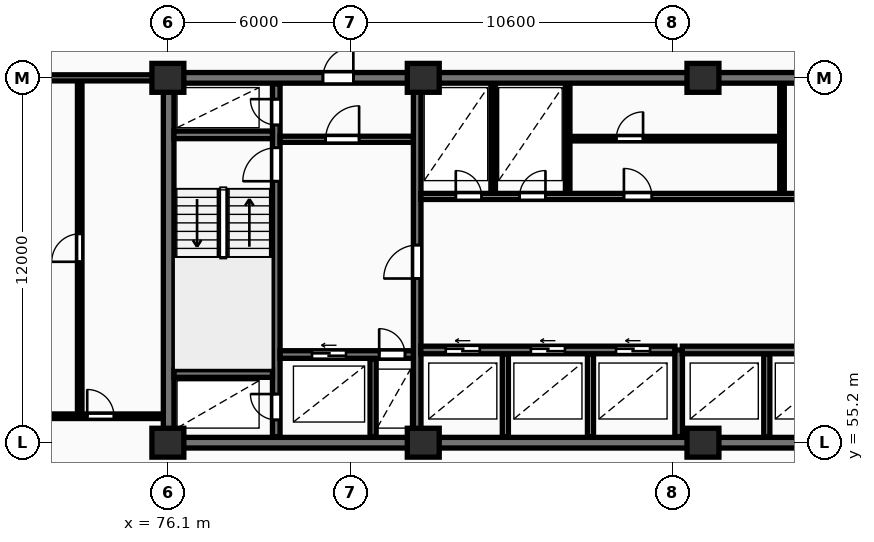
"""IFC4 building model, lengths in metres.
Left out: names, types, materials, properties, quantities, classifications, styles, units other than length and angle.
Written with IfcOpenShell. Run it as: python <this file> out.ifc"""

import sys

from ifc_helpers import new_model, si_unit, direction, frame, frame_2d, origin, origin_2d, place, context, subcontext, project, spatial, rectangle, extrude, element, fill, save


model = new_model("IFC4")
c1 = context("Model", 3, precision=1e-05, world=origin(), true_north=direction((0.0, 1.0)))
c2 = subcontext(c1, "Body", "Model", "MODEL_VIEW")
j1 = project(units=[si_unit("LENGTHUNIT", "METRE"), si_unit("PLANEANGLEUNIT", "RADIAN")], contexts=[c1])
p1 = place(None, origin())
s1 = spatial("IfcSite", under=j1, at=p1, CompositionType="ELEMENT")
p2 = place(p1, origin())
s2 = spatial("IfcBuilding", under=s1, at=p2, CompositionType="ELEMENT")
p3 = place(p2, frame((0.0, 0.0, 24.0)))
s3 = spatial("IfcBuildingStorey", under=s2, at=p3, CompositionType="ELEMENT", Elevation=24.0)
for number, where, z_axis, x_axis in (
    (1, (76.1, 55.2, 0.0), (0.0, 0.0, 1.0), (1.0, 0.0, 0.0)),
    (2, (76.1, 67.2, 0.0), (0.0, 0.0, 1.0), (1.0, 0.0, 0.0)),
    (3, (84.5, 55.2, 0.0), (0.0, 0.0, 1.0), (1.0, 0.0, 0.0)),
    (4, (84.5, 67.2, 0.0), (0.0, 0.0, 1.0), (1.0, 0.0, 0.0)),
    (5, (93.7, 55.2, 0.0), (0.0, 0.0, 1.0), (1.0, 0.0, 0.0)),
    (6, (93.7, 67.2, 0.0), (0.0, 0.0, 1.0), (1.0, 0.0, 0.0)),
):
    element("IfcColumn", number, at=place(p3, frame(where, z_axis=z_axis, x_axis=x_axis)), inside=s3, PredefinedType="COLUMN", context=c2, shape_type="SweptSolid", body=[
        extrude(rectangle(XDim=1.05, YDim=0.95, at=origin_2d()), origin(), (0.0, 0.0, 1.0), 3.25),
    ])
p4 = place(p3, frame((75.95, 55.2, 0.0), z_axis=(0.0, 0.0, 1.0), x_axis=(1.0, 0.0, 0.0)))
e7 = element("IfcWall", 7, at=p4, inside=s3, PredefinedType="SHEAR", context=c2, shape_type="SweptSolid", body=[
    extrude(rectangle(XDim=36.3, YDim=0.35, at=frame_2d((18.15, 0.0))), origin(), (0.0, 0.0, 1.0), 3.25),
])
p5 = place(p3, frame((76.125, 55.375, 0.0), z_axis=(0.0, 0.0, 1.0), x_axis=(0.0, 1.0, 0.0)))
e8 = element("IfcWall", 8, at=p5, inside=s3, PredefinedType="SHEAR", context=c2, shape_type="SweptSolid", body=[
    extrude(rectangle(XDim=11.65, YDim=0.35, at=frame_2d((5.825, 0.0))), origin(), (0.0, 0.0, 1.0), 3.25),
])
p6 = place(p3, frame((75.95, 67.2, 0.0), z_axis=(0.0, 0.0, 1.0), x_axis=(1.0, 0.0, 0.0)))
e9 = element("IfcWall", 9, at=p6, inside=s3, PredefinedType="SHEAR", context=c2, shape_type="SweptSolid", body=[
    extrude(rectangle(XDim=36.3, YDim=0.35, at=frame_2d((18.15, 0.0))), origin(), (0.0, 0.0, 1.0), 3.25),
])
p7 = place(p6, frame((5.25, 0.0, 0.0)))
e10 = element("IfcOpeningElement", 10, at=p7, cuts=e9, PredefinedType="OPENING", context=c2, shape_type="SweptSolid", body=[
    extrude(rectangle(XDim=1.0, YDim=2.15, at=frame_2d((0.5, 1.075))), frame((0.0, 0.185, 0.0), z_axis=(0.0, -1.0, 0.0), x_axis=(1.0, 0.0, 0.0)), (0.0, 0.0, 1.0), 0.37),
])
p8 = place(p6, frame((21.6, 0.0, 0.0)))
e11 = element("IfcOpeningElement", 11, at=p8, cuts=e9, PredefinedType="OPENING", context=c2, shape_type="SweptSolid", body=[
    extrude(rectangle(XDim=1.5, YDim=2.2, at=frame_2d((0.75, 1.1))), frame((0.0, 0.185, 0.0), z_axis=(0.0, -1.0, 0.0), x_axis=(1.0, 0.0, 0.0)), (0.0, 0.0, 1.0), 0.37),
])
p9 = place(p6, frame((30.45, 0.0, 0.0)))
e12 = element("IfcOpeningElement", 12, at=p9, cuts=e9, PredefinedType="OPENING", context=c2, shape_type="SweptSolid", body=[
    extrude(rectangle(XDim=1.0, YDim=2.15, at=frame_2d((0.5, 1.075))), frame((0.0, 0.185, 0.0), z_axis=(0.0, -1.0, 0.0), x_axis=(1.0, 0.0, 0.0)), (0.0, 0.0, 1.0), 0.37),
])
p10 = place(p3, frame((79.665, 55.4, 0.0), z_axis=(0.0, 0.0, 1.0), x_axis=(0.0, 1.0, 0.0)))
e13 = element("IfcWall", 13, at=p10, inside=s3, PredefinedType="SHEAR", context=c2, shape_type="SweptSolid", body=[
    extrude(rectangle(XDim=11.6, YDim=0.25, at=frame_2d((5.8, 0.0))), origin(), (0.0, 0.0, 1.0), 3.25),
])
p11 = place(p10, frame((0.55, 0.0, 0.0)))
e14 = element("IfcOpeningElement", 14, at=p11, cuts=e13, PredefinedType="OPENING", context=c2, shape_type="SweptSolid", body=[
    extrude(rectangle(XDim=0.85, YDim=2.05, at=frame_2d((0.425, 1.025))), frame((0.0, 0.135, 0.0), z_axis=(0.0, -1.0, 0.0), x_axis=(1.0, 0.0, 0.0)), (0.0, 0.0, 1.0), 0.27),
])
p12 = place(p10, frame((8.4, 0.0, 0.0)))
e15 = element("IfcOpeningElement", 15, at=p12, cuts=e13, PredefinedType="OPENING", context=c2, shape_type="SweptSolid", body=[
    extrude(rectangle(XDim=1.1, YDim=2.1, at=frame_2d((0.55, 1.05))), frame((0.0, 0.135, 0.0), z_axis=(0.0, -1.0, 0.0), x_axis=(1.0, 0.0, 0.0)), (0.0, 0.0, 1.0), 0.27),
])
p13 = place(p10, frame((10.25, 0.0, 0.0)))
e16 = element("IfcOpeningElement", 16, at=p13, cuts=e13, PredefinedType="OPENING", context=c2, shape_type="SweptSolid", body=[
    extrude(rectangle(XDim=0.85, YDim=2.05, at=frame_2d((0.425, 1.025))), frame((0.0, 0.135, 0.0), z_axis=(0.0, -1.0, 0.0), x_axis=(1.0, 0.0, 0.0)), (0.0, 0.0, 1.0), 0.27),
])
for number, where, z_axis, x_axis in (
    (17, (76.3, 57.475, 0.0), (0.0, 0.0, 1.0), (1.0, 0.0, 0.0)),
    (18, (76.3, 65.325, 0.0), (0.0, 0.0, 1.0), (1.0, 0.0, 0.0)),
):
    element("IfcWall", number, at=place(p3, frame(where, z_axis=z_axis, x_axis=x_axis)), inside=s3, PredefinedType="SHEAR", context=c2, shape_type="SweptSolid", body=[
        extrude(rectangle(XDim=3.24, YDim=0.25, at=frame_2d((1.62, 0.0))), origin(), (0.0, 0.0, 1.0), 3.25),
    ])
p14 = place(p3, frame((79.79, 58.1, 0.0), z_axis=(0.0, 0.0, 1.0), x_axis=(1.0, 0.0, 0.0)))
e19 = element("IfcWall", 19, at=p14, inside=s3, PredefinedType="SHEAR", context=c2, shape_type="SweptSolid", body=[
    extrude(rectangle(XDim=4.39, YDim=0.25, at=frame_2d((2.195, 0.0))), origin(), (0.0, 0.0, 1.0), 3.25),
])
p15 = place(p14, frame((1.05, 0.0, 0.0)))
e20 = element("IfcOpeningElement", 20, at=p15, cuts=e19, PredefinedType="OPENING", context=c2, shape_type="SweptSolid", body=[
    extrude(rectangle(XDim=1.12, YDim=2.12, at=frame_2d((0.56, 1.06))), frame((0.0, 0.135, 0.0), z_axis=(0.0, -1.0, 0.0), x_axis=(1.0, 0.0, 0.0)), (0.0, 0.0, 1.0), 0.27),
])
p16 = place(p14, frame((3.26, 0.0, 0.0)))
e21 = element("IfcOpeningElement", 21, at=p16, cuts=e19, PredefinedType="OPENING", context=c2, shape_type="SweptSolid", body=[
    extrude(rectangle(XDim=0.85, YDim=2.05, at=frame_2d((0.425, 1.025))), frame((0.0, 0.135, 0.0), z_axis=(0.0, -1.0, 0.0), x_axis=(1.0, 0.0, 0.0)), (0.0, 0.0, 1.0), 0.27),
])
p17 = place(p3, frame((82.85, 55.4, 0.0), z_axis=(0.0, 0.0, 1.0), x_axis=(0.0, 1.0, 0.0)))
e22 = element("IfcWall", 22, at=p17, inside=s3, PredefinedType="PARTITIONING", context=c2, shape_type="SweptSolid", body=[
    extrude(rectangle(XDim=2.56, YDim=0.2, at=frame_2d((1.28, 0.0))), origin(), (0.0, 0.0, 1.0), 2.97),
])
p18 = place(p3, frame((79.79, 65.18, 0.0), z_axis=(0.0, 0.0, 1.0), x_axis=(1.0, 0.0, 0.0)))
e23 = element("IfcWall", 23, at=p18, inside=s3, PredefinedType="PARTITIONING", context=c2, shape_type="SweptSolid", body=[
    extrude(rectangle(XDim=4.39, YDim=0.2, at=frame_2d((2.195, 0.0))), origin(), (0.0, 0.0, 1.0), 2.97),
])
p19 = place(p18, frame((1.5, 0.0, 0.0)))
e24 = element("IfcOpeningElement", 24, at=p19, cuts=e23, PredefinedType="OPENING", context=c2, shape_type="SweptSolid", body=[
    extrude(rectangle(XDim=1.1, YDim=2.1, at=frame_2d((0.55, 1.05))), frame((0.0, 0.11, 0.0), z_axis=(0.0, -1.0, 0.0), x_axis=(1.0, 0.0, 0.0)), (0.0, 0.0, 1.0), 0.22),
])
p20 = place(p3, frame((84.3, 55.4, 0.0), z_axis=(0.0, 0.0, 1.0), x_axis=(0.0, 1.0, 0.0)))
e25 = element("IfcWall", 25, at=p20, inside=s3, PredefinedType="SHEAR", context=c2, shape_type="SweptSolid", body=[
    extrude(rectangle(XDim=11.6, YDim=0.25, at=frame_2d((5.8, 0.0))), origin(), (0.0, 0.0, 1.0), 3.25),
])
p21 = place(p20, frame((5.2, 0.0, 0.0)))
e26 = element("IfcOpeningElement", 26, at=p21, cuts=e25, PredefinedType="OPENING", context=c2, shape_type="SweptSolid", body=[
    extrude(rectangle(XDim=1.1, YDim=2.1, at=frame_2d((0.55, 1.05))), frame((0.0, 0.135, 0.0), z_axis=(0.0, -1.0, 0.0), x_axis=(1.0, 0.0, 0.0)), (0.0, 0.0, 1.0), 0.27),
])
for number, where, z_axis, x_axis in (
    (27, (87.2, 55.4, 0.0), (0.0, 0.0, 1.0), (0.0, 1.0, 0.0)),
    (28, (90.0, 55.4, 0.0), (0.0, 0.0, 1.0), (0.0, 1.0, 0.0)),
):
    element("IfcWall", number, at=place(p3, frame(where, z_axis=z_axis, x_axis=x_axis)), inside=s3, PredefinedType="PARTITIONING", context=c2, shape_type="SweptSolid", body=[
        extrude(rectangle(XDim=2.72, YDim=0.2, at=frame_2d((1.36, 0.0))), origin(), (0.0, 0.0, 1.0), 2.97),
    ])
p22 = place(p3, frame((84.42, 58.25, 0.0), z_axis=(0.0, 0.0, 1.0), x_axis=(1.0, 0.0, 0.0)))
e29 = element("IfcWall", 29, at=p22, inside=s3, PredefinedType="SHEAR", context=c2, shape_type="SweptSolid", body=[
    extrude(rectangle(XDim=8.36, YDim=0.25, at=frame_2d((4.18, 0.0))), origin(), (0.0, 0.0, 1.0), 3.25),
])
p23 = place(p22, frame((0.82, 0.0, 0.0)))
e30 = element("IfcOpeningElement", 30, at=p23, cuts=e29, PredefinedType="OPENING", context=c2, shape_type="SweptSolid", body=[
    extrude(rectangle(XDim=1.12, YDim=2.12, at=frame_2d((0.56, 1.06))), frame((0.0, 0.135, 0.0), z_axis=(0.0, -1.0, 0.0), x_axis=(1.0, 0.0, 0.0)), (0.0, 0.0, 1.0), 0.27),
])
p24 = place(p22, frame((3.62, 0.0, 0.0)))
e31 = element("IfcOpeningElement", 31, at=p24, cuts=e29, PredefinedType="OPENING", context=c2, shape_type="SweptSolid", body=[
    extrude(rectangle(XDim=1.12, YDim=2.12, at=frame_2d((0.56, 1.06))), frame((0.0, 0.135, 0.0), z_axis=(0.0, -1.0, 0.0), x_axis=(1.0, 0.0, 0.0)), (0.0, 0.0, 1.0), 0.27),
])
p25 = place(p22, frame((6.42, 0.0, 0.0)))
e32 = element("IfcOpeningElement", 32, at=p25, cuts=e29, PredefinedType="OPENING", context=c2, shape_type="SweptSolid", body=[
    extrude(rectangle(XDim=1.12, YDim=2.12, at=frame_2d((0.56, 1.06))), frame((0.0, 0.135, 0.0), z_axis=(0.0, -1.0, 0.0), x_axis=(1.0, 0.0, 0.0)), (0.0, 0.0, 1.0), 0.27),
])
p26 = place(p3, frame((92.9, 55.4, 0.0), z_axis=(0.0, 0.0, 1.0), x_axis=(0.0, 1.0, 0.0)))
e33 = element("IfcWall", 33, at=p26, inside=s3, PredefinedType="SHEAR", context=c2, shape_type="SweptSolid", body=[
    extrude(rectangle(XDim=2.85, YDim=0.25, at=frame_2d((1.425, 0.0))), origin(), (0.0, 0.0, 1.0), 3.25),
])
p27 = place(p3, frame((95.8, 55.4, 0.0), z_axis=(0.0, 0.0, 1.0), x_axis=(0.0, 1.0, 0.0)))
e34 = element("IfcWall", 34, at=p27, inside=s3, PredefinedType="PARTITIONING", context=c2, shape_type="SweptSolid", body=[
    extrude(rectangle(XDim=2.72, YDim=0.2, at=frame_2d((1.36, 0.0))), origin(), (0.0, 0.0, 1.0), 2.97),
])
p28 = place(p3, frame((93.02, 58.25, 0.0), z_axis=(0.0, 0.0, 1.0), x_axis=(1.0, 0.0, 0.0)))
e35 = element("IfcWall", 35, at=p28, inside=s3, PredefinedType="SHEAR", context=c2, shape_type="SweptSolid", body=[
    extrude(rectangle(XDim=8.36, YDim=0.25, at=frame_2d((4.18, 0.0))), origin(), (0.0, 0.0, 1.0), 3.25),
])
for number, where, z_axis, x_axis in (
    (36, (86.8, 63.4, 0.0), (0.0, 0.0, 1.0), (0.0, 1.0, 0.0)),
    (37, (89.25, 63.4, 0.0), (0.0, 0.0, 1.0), (0.0, 1.0, 0.0)),
):
    element("IfcWall", number, at=place(p3, frame(where, z_axis=z_axis, x_axis=x_axis)), inside=s3, PredefinedType="PARTITIONING", context=c2, shape_type="SweptSolid", body=[
        extrude(rectangle(XDim=3.6, YDim=0.15, at=frame_2d((1.8, 0.0))), origin(), (0.0, 0.0, 1.0), 2.97),
    ])
p29 = place(p3, frame((89.25, 65.2, 0.0), z_axis=(0.0, 0.0, 1.0), x_axis=(1.0, 0.0, 0.0)))
e38 = element("IfcWall", 38, at=p29, inside=s3, PredefinedType="PARTITIONING", context=c2, shape_type="SweptSolid", body=[
    extrude(rectangle(XDim=7.05, YDim=0.15, at=frame_2d((3.525, 0.0))), origin(), (0.0, 0.0, 1.0), 2.97),
])
p30 = place(p29, frame((1.6, 0.0, 0.0)))
e39 = element("IfcOpeningElement", 39, at=p30, cuts=e38, PredefinedType="OPENING", context=c2, shape_type="SweptSolid", body=[
    extrude(rectangle(XDim=0.88, YDim=2.06, at=frame_2d((0.44, 1.03))), frame((0.0, 0.085, 0.0), z_axis=(0.0, -1.0, 0.0), x_axis=(1.0, 0.0, 0.0)), (0.0, 0.0, 1.0), 0.17),
])
p31 = place(p3, frame((96.3, 63.4, 0.0), z_axis=(0.0, 0.0, 1.0), x_axis=(0.0, 1.0, 0.0)))
e40 = element("IfcWall", 40, at=p31, inside=s3, PredefinedType="PARTITIONING", context=c2, shape_type="SweptSolid", body=[
    extrude(rectangle(XDim=3.6, YDim=0.15, at=frame_2d((1.8, 0.0))), origin(), (0.0, 0.0, 1.0), 2.97),
])
p32 = place(p3, frame((84.42, 63.3, 0.0), z_axis=(0.0, 0.0, 1.0), x_axis=(1.0, 0.0, 0.0)))
e41 = element("IfcWall", 41, at=p32, inside=s3, PredefinedType="PARTITIONING", context=c2, shape_type="SweptSolid", body=[
    extrude(rectangle(XDim=19.83, YDim=0.2, at=frame_2d((9.915, 0.0))), origin(), (0.0, 0.0, 1.0), 2.97),
])
p33 = place(p32, frame((1.15, 0.0, 0.0)))
e42 = element("IfcOpeningElement", 42, at=p33, cuts=e41, PredefinedType="OPENING", context=c2, shape_type="SweptSolid", body=[
    extrude(rectangle(XDim=0.85, YDim=2.05, at=frame_2d((0.425, 1.025))), frame((0.0, 0.11, 0.0), z_axis=(0.0, -1.0, 0.0), x_axis=(1.0, 0.0, 0.0)), (0.0, 0.0, 1.0), 0.22),
])
p34 = place(p32, frame((3.25, 0.0, 0.0)))
e43 = element("IfcOpeningElement", 43, at=p34, cuts=e41, PredefinedType="OPENING", context=c2, shape_type="SweptSolid", body=[
    extrude(rectangle(XDim=0.85, YDim=2.05, at=frame_2d((0.425, 1.025))), frame((0.0, 0.11, 0.0), z_axis=(0.0, -1.0, 0.0), x_axis=(1.0, 0.0, 0.0)), (0.0, 0.0, 1.0), 0.22),
])
p35 = place(p32, frame((13.08, 0.0, 0.0)))
e44 = element("IfcOpeningElement", 44, at=p35, cuts=e41, PredefinedType="OPENING", context=c2, shape_type="SweptSolid", body=[
    extrude(rectangle(XDim=1.5, YDim=2.2, at=frame_2d((0.75, 1.1))), frame((0.0, 0.11, 0.0), z_axis=(0.0, -1.0, 0.0), x_axis=(1.0, 0.0, 0.0)), (0.0, 0.0, 1.0), 0.22),
])
p36 = place(p32, frame((6.68, 0.0, 0.0)))
e45 = element("IfcOpeningElement", 45, at=p36, cuts=e41, PredefinedType="OPENING", context=c2, shape_type="SweptSolid", body=[
    extrude(rectangle(XDim=0.92, YDim=2.08, at=frame_2d((0.46, 1.04))), frame((0.0, 0.11, 0.0), z_axis=(0.0, -1.0, 0.0), x_axis=(1.0, 0.0, 0.0)), (0.0, 0.0, 1.0), 0.22),
])
p37 = place(p32, frame((16.33, 0.0, 0.0)))
e46 = element("IfcOpeningElement", 46, at=p37, cuts=e41, PredefinedType="OPENING", context=c2, shape_type="SweptSolid", body=[
    extrude(rectangle(XDim=0.88, YDim=2.06, at=frame_2d((0.44, 1.03))), frame((0.0, 0.11, 0.0), z_axis=(0.0, -1.0, 0.0), x_axis=(1.0, 0.0, 0.0)), (0.0, 0.0, 1.0), 0.22),
])
p38 = place(p3, frame((73.2, 56.07, 0.0), z_axis=(0.0, 0.0, 1.0), x_axis=(0.0, 1.0, 0.0)))
e47 = element("IfcWall", 47, at=p38, inside=s3, PredefinedType="PARTITIONING", context=c2, shape_type="SweptSolid", body=[
    extrude(rectangle(XDim=11.08, YDim=0.15, at=frame_2d((5.54, 0.0))), origin(), (0.0, 0.0, 1.0), 2.97),
])
p39 = place(p38, frame((5.08, 0.0, 0.0)))
e48 = element("IfcOpeningElement", 48, at=p39, cuts=e47, PredefinedType="OPENING", context=c2, shape_type="SweptSolid", body=[
    extrude(rectangle(XDim=0.92, YDim=2.08, at=frame_2d((0.46, 1.04))), frame((0.0, 0.085, 0.0), z_axis=(0.0, -1.0, 0.0), x_axis=(1.0, 0.0, 0.0)), (0.0, 0.0, 1.0), 0.17),
])
p40 = place(p3, frame((69.17, 56.07, 0.0), z_axis=(0.0, 0.0, 1.0), x_axis=(1.0, 0.0, 0.0)))
e49 = element("IfcWall", 49, at=p40, inside=s3, PredefinedType="PARTITIONING", context=c2, shape_type="SweptSolid", body=[
    extrude(rectangle(XDim=6.76, YDim=0.15, at=frame_2d((3.38, 0.0))), origin(), (0.0, 0.0, 1.0), 2.97),
])
p41 = place(p40, frame((1.362, 0.0, 0.0)))
e50 = element("IfcOpeningElement", 50, at=p41, cuts=e49, PredefinedType="OPENING", context=c2, shape_type="SweptSolid", body=[
    extrude(rectangle(XDim=0.84, YDim=2.04, at=frame_2d((0.42, 1.02))), frame((0.0, 0.085, 0.0), z_axis=(0.0, -1.0, 0.0), x_axis=(1.0, 0.0, 0.0)), (0.0, 0.0, 1.0), 0.17),
])
p42 = place(p40, frame((4.277, 0.0, 0.0)))
e51 = element("IfcOpeningElement", 51, at=p42, cuts=e49, PredefinedType="OPENING", context=c2, shape_type="SweptSolid", body=[
    extrude(rectangle(XDim=0.88, YDim=2.06, at=frame_2d((0.44, 1.03))), frame((0.0, 0.085, 0.0), z_axis=(0.0, -1.0, 0.0), x_axis=(1.0, 0.0, 0.0)), (0.0, 0.0, 1.0), 0.17),
])
p43 = place(p3, frame((55.3, 67.2, 0.0), z_axis=(0.0, 0.0, 1.0), x_axis=(1.0, 0.0, 0.0)))
e52 = element("IfcWall", 52, at=p43, inside=s3, PredefinedType="PARTITIONING", context=c2, shape_type="SweptSolid", body=[
    extrude(rectangle(XDim=20.65, YDim=0.2, at=frame_2d((10.325, 0.0))), origin(), (0.0, 0.0, 1.0), 2.37),
])
p44 = place(p43, frame((14.426, 0.0, 0.0)))
e53 = element("IfcOpeningElement", 53, at=p44, cuts=e52, PredefinedType="OPENING", context=c2, shape_type="SweptSolid", body=[
    extrude(rectangle(XDim=0.95, YDim=2.15, at=frame_2d((0.475, 1.075))), frame((0.0, 0.11, 0.0), z_axis=(0.0, -1.0, 0.0), x_axis=(1.0, 0.0, 0.0)), (0.0, 0.0, 1.0), 0.22),
])
p45 = place(p7, origin())
e54 = element("IfcDoor", 54, at=p45, inside=s3, OperationType="SINGLE_SWING_RIGHT", PredefinedType="DOOR", context=c2, shape_type="SweptSolid", body=[
    extrude(rectangle(XDim=1.0, YDim=2.15, at=frame_2d((0.5, 1.075))), frame((0.0, 0.025, 0.0), z_axis=(0.0, -1.0, 0.0), x_axis=(1.0, 0.0, 0.0)), (0.0, 0.0, 1.0), 0.05),
])
fill(e10, e54)
p46 = place(p11, origin())
e55 = element("IfcDoor", 55, at=p46, inside=s3, OperationType="SINGLE_SWING_RIGHT", PredefinedType="DOOR", context=c2, shape_type="SweptSolid", body=[
    extrude(rectangle(XDim=0.85, YDim=2.05, at=frame_2d((0.425, 1.025))), frame((0.0, 0.025, 0.0), z_axis=(0.0, -1.0, 0.0), x_axis=(1.0, 0.0, 0.0)), (0.0, 0.0, 1.0), 0.05),
])
fill(e14, e55)
p47 = place(p12, origin())
e56 = element("IfcDoor", 56, at=p47, inside=s3, OperationType="SINGLE_SWING_LEFT", PredefinedType="DOOR", context=c2, shape_type="SweptSolid", body=[
    extrude(rectangle(XDim=1.1, YDim=2.1, at=frame_2d((0.55, 1.05))), frame((0.0, 0.025, 0.0), z_axis=(0.0, -1.0, 0.0), x_axis=(1.0, 0.0, 0.0)), (0.0, 0.0, 1.0), 0.05),
])
fill(e15, e56)
p48 = place(p13, origin())
e57 = element("IfcDoor", 57, at=p48, inside=s3, OperationType="SINGLE_SWING_RIGHT", PredefinedType="DOOR", context=c2, shape_type="SweptSolid", body=[
    extrude(rectangle(XDim=0.85, YDim=2.05, at=frame_2d((0.425, 1.025))), frame((0.0, 0.025, 0.0), z_axis=(0.0, -1.0, 0.0), x_axis=(1.0, 0.0, 0.0)), (0.0, 0.0, 1.0), 0.05),
])
fill(e16, e57)
p49 = place(p15, origin())
e58 = element("IfcDoor", 58, at=p49, inside=s3, OperationType="SLIDING_TO_LEFT", PredefinedType="DOOR", context=c2, shape_type="SweptSolid", body=[
    extrude(rectangle(XDim=1.12, YDim=2.12, at=frame_2d((0.56, 1.06))), frame((0.0, 0.025, 0.0), z_axis=(0.0, -1.0, 0.0), x_axis=(1.0, 0.0, 0.0)), (0.0, 0.0, 1.0), 0.05),
])
fill(e20, e58)
p50 = place(p16, origin())
e59 = element("IfcDoor", 59, at=p50, inside=s3, OperationType="SINGLE_SWING_LEFT", PredefinedType="DOOR", context=c2, shape_type="SweptSolid", body=[
    extrude(rectangle(XDim=0.85, YDim=2.05, at=frame_2d((0.425, 1.025))), frame((0.0, 0.025, 0.0), z_axis=(0.0, -1.0, 0.0), x_axis=(1.0, 0.0, 0.0)), (0.0, 0.0, 1.0), 0.05),
])
fill(e21, e59)
p51 = place(p19, origin())
e60 = element("IfcDoor", 60, at=p51, inside=s3, OperationType="SINGLE_SWING_RIGHT", PredefinedType="DOOR", context=c2, shape_type="SweptSolid", body=[
    extrude(rectangle(XDim=1.1, YDim=2.1, at=frame_2d((0.55, 1.05))), frame((0.0, 0.025, 0.0), z_axis=(0.0, -1.0, 0.0), x_axis=(1.0, 0.0, 0.0)), (0.0, 0.0, 1.0), 0.05),
])
fill(e24, e60)
p52 = place(p21, origin())
e61 = element("IfcDoor", 61, at=p52, inside=s3, OperationType="SINGLE_SWING_LEFT", PredefinedType="DOOR", context=c2, shape_type="SweptSolid", body=[
    extrude(rectangle(XDim=1.1, YDim=2.1, at=frame_2d((0.55, 1.05))), frame((0.0, 0.025, 0.0), z_axis=(0.0, -1.0, 0.0), x_axis=(1.0, 0.0, 0.0)), (0.0, 0.0, 1.0), 0.05),
])
fill(e26, e61)
p53 = place(p23, origin())
e62 = element("IfcDoor", 62, at=p53, inside=s3, OperationType="SLIDING_TO_LEFT", PredefinedType="DOOR", context=c2, shape_type="SweptSolid", body=[
    extrude(rectangle(XDim=1.12, YDim=2.12, at=frame_2d((0.56, 1.06))), frame((0.0, 0.025, 0.0), z_axis=(0.0, -1.0, 0.0), x_axis=(1.0, 0.0, 0.0)), (0.0, 0.0, 1.0), 0.05),
])
fill(e30, e62)
p54 = place(p24, origin())
e63 = element("IfcDoor", 63, at=p54, inside=s3, OperationType="SLIDING_TO_LEFT", PredefinedType="DOOR", context=c2, shape_type="SweptSolid", body=[
    extrude(rectangle(XDim=1.12, YDim=2.12, at=frame_2d((0.56, 1.06))), frame((0.0, 0.025, 0.0), z_axis=(0.0, -1.0, 0.0), x_axis=(1.0, 0.0, 0.0)), (0.0, 0.0, 1.0), 0.05),
])
fill(e31, e63)
p55 = place(p25, origin())
e64 = element("IfcDoor", 64, at=p55, inside=s3, OperationType="SLIDING_TO_LEFT", PredefinedType="DOOR", context=c2, shape_type="SweptSolid", body=[
    extrude(rectangle(XDim=1.12, YDim=2.12, at=frame_2d((0.56, 1.06))), frame((0.0, 0.025, 0.0), z_axis=(0.0, -1.0, 0.0), x_axis=(1.0, 0.0, 0.0)), (0.0, 0.0, 1.0), 0.05),
])
fill(e32, e64)
p56 = place(p30, origin())
e65 = element("IfcDoor", 65, at=p56, inside=s3, OperationType="SINGLE_SWING_RIGHT", PredefinedType="DOOR", context=c2, shape_type="SweptSolid", body=[
    extrude(rectangle(XDim=0.88, YDim=2.06, at=frame_2d((0.44, 1.03))), frame((0.0, 0.025, 0.0), z_axis=(0.0, -1.0, 0.0), x_axis=(1.0, 0.0, 0.0)), (0.0, 0.0, 1.0), 0.05),
])
fill(e39, e65)
p57 = place(p33, origin())
e66 = element("IfcDoor", 66, at=p57, inside=s3, OperationType="SINGLE_SWING_LEFT", PredefinedType="DOOR", context=c2, shape_type="SweptSolid", body=[
    extrude(rectangle(XDim=0.85, YDim=2.05, at=frame_2d((0.425, 1.025))), frame((0.0, 0.025, 0.0), z_axis=(0.0, -1.0, 0.0), x_axis=(1.0, 0.0, 0.0)), (0.0, 0.0, 1.0), 0.05),
])
fill(e42, e66)
p58 = place(p34, origin())
e67 = element("IfcDoor", 67, at=p58, inside=s3, OperationType="SINGLE_SWING_RIGHT", PredefinedType="DOOR", context=c2, shape_type="SweptSolid", body=[
    extrude(rectangle(XDim=0.85, YDim=2.05, at=frame_2d((0.425, 1.025))), frame((0.0, 0.025, 0.0), z_axis=(0.0, -1.0, 0.0), x_axis=(1.0, 0.0, 0.0)), (0.0, 0.0, 1.0), 0.05),
])
fill(e43, e67)
p59 = place(p36, origin())
e68 = element("IfcDoor", 68, at=p59, inside=s3, OperationType="SINGLE_SWING_LEFT", PredefinedType="DOOR", context=c2, shape_type="SweptSolid", body=[
    extrude(rectangle(XDim=0.92, YDim=2.08, at=frame_2d((0.46, 1.04))), frame((0.0, 0.025, 0.0), z_axis=(0.0, -1.0, 0.0), x_axis=(1.0, 0.0, 0.0)), (0.0, 0.0, 1.0), 0.05),
])
fill(e45, e68)
p60 = place(p39, origin())
e69 = element("IfcDoor", 69, at=p60, inside=s3, OperationType="SINGLE_SWING_LEFT", PredefinedType="DOOR", context=c2, shape_type="SweptSolid", body=[
    extrude(rectangle(XDim=0.92, YDim=2.08, at=frame_2d((0.46, 1.04))), frame((0.0, 0.025, 0.0), z_axis=(0.0, -1.0, 0.0), x_axis=(1.0, 0.0, 0.0)), (0.0, 0.0, 1.0), 0.05),
])
fill(e48, e69)
p61 = place(p42, origin())
e70 = element("IfcDoor", 70, at=p61, inside=s3, OperationType="SINGLE_SWING_LEFT", PredefinedType="DOOR", context=c2, shape_type="SweptSolid", body=[
    extrude(rectangle(XDim=0.88, YDim=2.06, at=frame_2d((0.44, 1.03))), frame((0.0, 0.025, 0.0), z_axis=(0.0, -1.0, 0.0), x_axis=(1.0, 0.0, 0.0)), (0.0, 0.0, 1.0), 0.05),
])
fill(e51, e70)
save(model, sys.argv[1])
